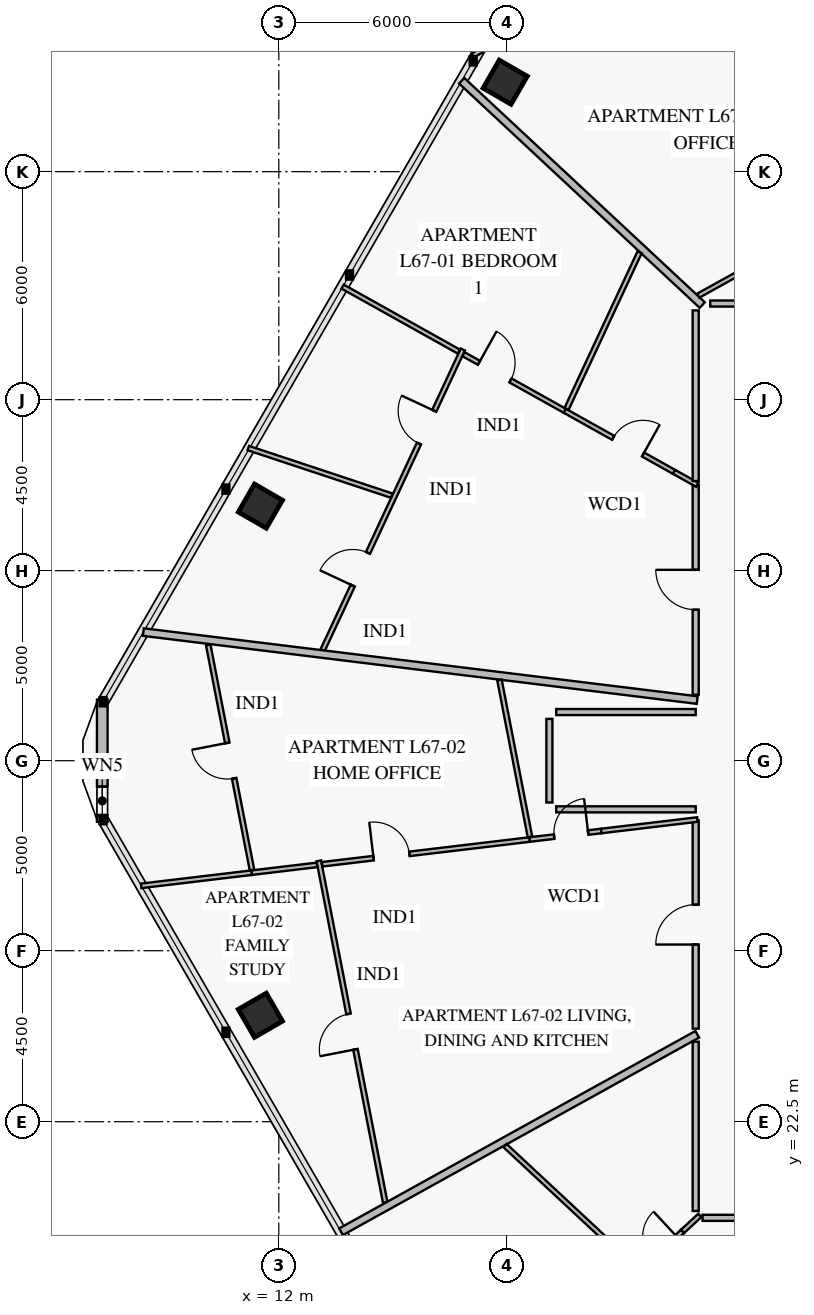
"""IFC4 building model, lengths in metres.
Left out: names, types, materials, properties, quantities, classifications, styles, units other than length and angle.
Written with IfcOpenShell. Run it as: python <this file> out.ifc"""

import sys

from ifc_helpers import new_model, si_unit, direction, frame, frame_2d, origin, origin_2d, place, context, subcontext, project, spatial, rectangle, extrude, element, fill, save


model = new_model("IFC4")
c1 = context("Model", 3, precision=1e-05, world=origin(), true_north=direction((0.0, 1.0)))
c2 = subcontext(c1, "Body", "Model", "MODEL_VIEW")
j1 = project(units=[si_unit("LENGTHUNIT", "METRE"), si_unit("PLANEANGLEUNIT", "RADIAN")], contexts=[c1])
p1 = place(None, origin())
s1 = spatial("IfcSite", under=j1, at=p1, CompositionType="ELEMENT")
p2 = place(p1, origin())
s2 = spatial("IfcBuilding", under=s1, at=p2, CompositionType="ELEMENT")
p3 = place(p2, frame((0.0, 0.0, 265.4)))
s3 = spatial("IfcBuildingStorey", under=s2, at=p3, CompositionType="ELEMENT", Elevation=265.4)
for number, where, z_axis, x_axis in (
    (1, (17.956, 49.855, 0.0), (0.0, 0.0, 1.0), (-0.5, -0.866, 0.0)),
    (2, (11.515, 38.699, 0.0), (0.0, 0.0, 1.0), (-0.5, -0.866, 0.0)),
    (3, (11.515, 25.301, 0.0), (0.0, 0.0, 1.0), (0.5, -0.866, 0.0)),
):
    element("IfcColumn", number, at=place(p3, frame(where, z_axis=z_axis, x_axis=x_axis)), inside=s3, PredefinedType="COLUMN", context=c2, shape_type="SweptSolid", body=[
        extrude(rectangle(XDim=0.85, YDim=0.85, at=origin_2d()), origin(), (0.0, 0.0, 1.0), 3.55),
    ])
p4 = place(p3, frame((7.355, 30.393, 0.0), z_axis=(0.0, 0.0, 1.0), x_axis=(0.0, 1.0, 0.0)))
e4 = element("IfcWall", 4, at=p4, inside=s3, PredefinedType="SOLIDWALL", context=c2, shape_type="SweptSolid", body=[
    extrude(rectangle(XDim=3.215, YDim=0.28, at=frame_2d((1.607, 0.0))), origin(), (0.0, 0.0, 1.0), 3.55),
])
p5 = place(p4, frame((0.176, 0.0, 0.85)))
e5 = element("IfcOpeningElement", 5, at=p5, cuts=e4, PredefinedType="OPENING", context=c2, shape_type="SweptSolid", body=[
    extrude(rectangle(XDim=0.75, YDim=1.5, at=frame_2d((0.375, 0.75))), frame((0.0, 0.152, 0.0), z_axis=(0.0, -1.0, 0.0), x_axis=(1.0, 0.0, 0.0)), (0.0, 0.0, 1.0), 0.304),
])
p6 = place(p3, frame((16.843, 42.821, 0.0), z_axis=(0.0, 0.0, 1.0), x_axis=(-0.422622187682, -0.90630595633, 0.0)))
e6 = element("IfcWall", 6, at=p6, inside=s3, PredefinedType="PARTITIONING", context=c2, shape_type="SweptSolid", body=[
    extrude(rectangle(XDim=8.732, YDim=0.12, at=frame_2d((4.366, 0.0))), origin(), (0.0, 0.0, 1.0), 2.95),
])
p7 = place(p6, frame((1.78, 0.0, 0.0)))
e7 = element("IfcOpeningElement", 7, at=p7, cuts=e6, PredefinedType="OPENING", context=c2, shape_type="SweptSolid", body=[
    extrude(rectangle(XDim=0.95, YDim=2.1, at=frame_2d((0.475, 1.05))), frame((0.0, 0.072, 0.0), z_axis=(0.0, -1.0, 0.0), x_axis=(1.0, 0.0, 0.0)), (0.0, 0.0, 1.0), 0.144),
])
p8 = place(p6, frame((5.906, 0.0, 0.0)))
e8 = element("IfcOpeningElement", 8, at=p8, cuts=e6, PredefinedType="OPENING", context=c2, shape_type="SweptSolid", body=[
    extrude(rectangle(XDim=0.95, YDim=2.1, at=frame_2d((0.475, 1.05))), frame((0.0, 0.072, 0.0), z_axis=(0.0, -1.0, 0.0), x_axis=(1.0, 0.0, 0.0)), (0.0, 0.0, 1.0), 0.144),
])
p9 = place(p3, frame((22.4, 39.601, 0.0), z_axis=(0.0, 0.0, 1.0), x_axis=(-0.8729286445, 0.487847908279, 0.0)))
e9 = element("IfcWall", 9, at=p9, inside=s3, PredefinedType="PARTITIONING", context=c2, shape_type="SweptSolid", body=[
    extrude(rectangle(XDim=3.297, YDim=0.12, at=frame_2d((1.649, 0.0))), origin(), (0.0, 0.0, 1.0), 3.15),
])
p10 = place(p9, frame((0.935, 0.0, 0.0)))
e10 = element("IfcOpeningElement", 10, at=p10, cuts=e9, PredefinedType="OPENING", context=c2, shape_type="SweptSolid", body=[
    extrude(rectangle(XDim=0.9, YDim=2.1, at=frame_2d((0.45, 1.05))), frame((0.0, 0.072, 0.0), z_axis=(0.0, -1.0, 0.0), x_axis=(1.0, 0.0, 0.0)), (0.0, 0.0, 1.0), 0.144),
])
p11 = place(p3, frame((19.521, 41.209, 0.0), z_axis=(0.0, 0.0, 1.0), x_axis=(-0.87290035316, 0.487898527824, 0.0)))
e11 = element("IfcWall", 11, at=p11, inside=s3, PredefinedType="PARTITIONING", context=c2, shape_type="SweptSolid", body=[
    extrude(rectangle(XDim=3.049, YDim=0.12, at=frame_2d((1.524, 0.0))), origin(), (0.0, 0.0, 1.0), 3.55),
])
p12 = place(p11, frame((1.633, 0.0, 0.0)))
e12 = element("IfcOpeningElement", 12, at=p12, cuts=e11, PredefinedType="OPENING", context=c2, shape_type="SweptSolid", body=[
    extrude(rectangle(XDim=0.95, YDim=2.1, at=frame_2d((0.475, 1.05))), frame((0.0, 0.072, 0.0), z_axis=(0.0, -1.0, 0.0), x_axis=(1.0, 0.0, 0.0)), (0.0, 0.0, 1.0), 0.144),
])
p13 = place(p3, frame((16.741, 42.763, 0.0), z_axis=(0.0, 0.0, 1.0), x_axis=(-0.872910360515, 0.487880623212, 0.0)))
e13 = element("IfcWall", 13, at=p13, inside=s3, PredefinedType="PARTITIONING", context=c2, shape_type="SweptSolid", body=[
    extrude(rectangle(XDim=3.508, YDim=0.12, at=frame_2d((1.754, 0.0))), origin(), (0.0, 0.0, 1.0), 2.93),
])
p14 = place(p3, frame((22.97, 39.259, 0.0), z_axis=(0.0, 0.0, 1.0), x_axis=(0.0, -1.0, 0.0)))
e14 = element("IfcWall", 14, at=p14, inside=s3, PredefinedType="PARTITIONING", context=c2, shape_type="SweptSolid", body=[
    extrude(rectangle(XDim=5.524, YDim=0.16, at=frame_2d((2.762, 0.0))), origin(), (0.0, 0.0, 1.0), 2.95),
])
p15 = place(p14, frame((2.237, 0.0, 0.0)))
e15 = element("IfcOpeningElement", 15, at=p15, cuts=e14, PredefinedType="OPENING", context=c2, shape_type="SweptSolid", body=[
    extrude(rectangle(XDim=1.05, YDim=2.15, at=frame_2d((0.525, 1.075))), frame((0.0, 0.092, 0.0), z_axis=(0.0, -1.0, 0.0), x_axis=(1.0, 0.0, 0.0)), (0.0, 0.0, 1.0), 0.184),
])
p16 = place(p3, frame((13.053, 29.365, 0.0), z_axis=(0.0, 0.0, 1.0), x_axis=(0.190811857209, -0.981626627159, 0.0)))
e16 = element("IfcWall", 16, at=p16, inside=s3, PredefinedType="PARTITIONING", context=c2, shape_type="SweptSolid", body=[
    extrude(rectangle(XDim=9.157, YDim=0.12, at=frame_2d((4.579, 0.0))), origin(), (0.0, 0.0, 1.0), 2.95),
])
p17 = place(p16, frame((4.104, 0.0, 0.0)))
e17 = element("IfcOpeningElement", 17, at=p17, cuts=e16, PredefinedType="OPENING", context=c2, shape_type="SweptSolid", body=[
    extrude(rectangle(XDim=0.95, YDim=2.1, at=frame_2d((0.475, 1.05))), frame((0.0, 0.072, 0.0), z_axis=(0.0, -1.0, 0.0), x_axis=(1.0, 0.0, 0.0)), (0.0, 0.0, 1.0), 0.144),
])
p18 = place(p3, frame((20.486, 30.15, 0.0), z_axis=(0.0, 0.0, 1.0), x_axis=(-0.992972480761, -0.118345479222, 0.0)))
e18 = element("IfcWall", 18, at=p18, inside=s3, PredefinedType="PARTITIONING", context=c2, shape_type="SweptSolid", body=[
    extrude(rectangle(XDim=1.902, YDim=0.12, at=frame_2d((0.951, 0.0))), origin(), (0.0, 0.0, 1.0), 3.55),
])
p19 = place(p18, frame((0.349, 0.0, 0.0)))
e19 = element("IfcOpeningElement", 19, at=p19, cuts=e18, PredefinedType="OPENING", context=c2, shape_type="SweptSolid", body=[
    extrude(rectangle(XDim=0.9, YDim=2.1, at=frame_2d((0.45, 1.05))), frame((0.0, 0.072, 0.0), z_axis=(0.0, -1.0, 0.0), x_axis=(1.0, 0.0, 0.0)), (0.0, 0.0, 1.0), 0.144),
])
p20 = place(p3, frame((18.597, 29.925, 0.0), z_axis=(0.0, 0.0, 1.0), x_axis=(-0.992967773956, -0.118384964774, 0.0)))
e20 = element("IfcWall", 20, at=p20, inside=s3, PredefinedType="PARTITIONING", context=c2, shape_type="SweptSolid", body=[
    extrude(rectangle(XDim=5.496, YDim=0.12, at=frame_2d((2.748, 0.0))), origin(), (0.0, 0.0, 1.0), 3.55),
])
p21 = place(p20, frame((3.183, 0.0, 0.0)))
e21 = element("IfcOpeningElement", 21, at=p21, cuts=e20, PredefinedType="OPENING", context=c2, shape_type="SweptSolid", body=[
    extrude(rectangle(XDim=0.95, YDim=2.1, at=frame_2d((0.475, 1.05))), frame((0.0, 0.072, 0.0), z_axis=(0.0, -1.0, 0.0), x_axis=(1.0, 0.0, 0.0)), (0.0, 0.0, 1.0), 0.144),
])
p22 = place(p3, frame((13.004, 29.258, 0.0), z_axis=(0.0, 0.0, 1.0), x_axis=(-0.992978430898, -0.118295544172, 0.0)))
e22 = element("IfcWall", 22, at=p22, inside=s3, PredefinedType="PARTITIONING", context=c2, shape_type="SweptSolid", body=[
    extrude(rectangle(XDim=1.734, YDim=0.12, at=frame_2d((0.867, 0.0))), origin(), (0.0, 0.0, 1.0), 2.93),
])
p23 = place(p3, frame((10.143, 35.047, 0.0), z_axis=(0.0, 0.0, 1.0), x_axis=(0.190784117101, -0.981632018967, 0.0)))
e23 = element("IfcWall", 23, at=p23, inside=s3, PredefinedType="PARTITIONING", context=c2, shape_type="SweptSolid", body=[
    extrude(rectangle(XDim=6.035, YDim=0.12, at=frame_2d((3.018, 0.0))), origin(), (0.0, 0.0, 1.0), 3.55),
])
p24 = place(p23, frame((2.627, 0.0, 0.0)))
e24 = element("IfcOpeningElement", 24, at=p24, cuts=e23, PredefinedType="OPENING", context=c2, shape_type="SweptSolid", body=[
    extrude(rectangle(XDim=0.95, YDim=2.1, at=frame_2d((0.475, 1.05))), frame((0.0, 0.072, 0.0), z_axis=(0.0, -1.0, 0.0), x_axis=(1.0, 0.0, 0.0)), (0.0, 0.0, 1.0), 0.144),
])
p25 = place(p3, frame((22.97, 30.426, 0.0), z_axis=(0.0, 0.0, 1.0), x_axis=(0.0, -1.0, 0.0)))
e25 = element("IfcWall", 25, at=p25, inside=s3, PredefinedType="PARTITIONING", context=c2, shape_type="SweptSolid", body=[
    extrude(rectangle(XDim=5.478, YDim=0.16, at=frame_2d((2.739, 0.0))), origin(), (0.0, 0.0, 1.0), 2.95),
])
p26 = place(p25, frame((2.214, 0.0, 0.0)))
e26 = element("IfcOpeningElement", 26, at=p26, cuts=e25, PredefinedType="OPENING", context=c2, shape_type="SweptSolid", body=[
    extrude(rectangle(XDim=1.05, YDim=2.15, at=frame_2d((0.525, 1.075))), frame((0.0, 0.092, 0.0), z_axis=(0.0, -1.0, 0.0), x_axis=(1.0, 0.0, 0.0)), (0.0, 0.0, 1.0), 0.184),
])
p27 = place(p3, frame((22.625, 19.615, 0.0), z_axis=(0.0, 0.0, 1.0), x_axis=(-0.733731867306, -0.679439141424, 0.0)))
e27 = element("IfcWall", 27, at=p27, inside=s3, PredefinedType="PARTITIONING", context=c2, shape_type="SweptSolid", body=[
    extrude(rectangle(XDim=1.565, YDim=0.12, at=frame_2d((0.782, 0.0))), origin(), (0.0, 0.0, 1.0), 3.55),
])
p28 = place(p27, frame((0.207, 0.0, 0.0)))
e28 = element("IfcOpeningElement", 28, at=p28, cuts=e27, PredefinedType="OPENING", context=c2, shape_type="SweptSolid", body=[
    extrude(rectangle(XDim=0.9, YDim=2.1, at=frame_2d((0.45, 1.05))), frame((0.0, 0.072, 0.0), z_axis=(0.0, -1.0, 0.0), x_axis=(1.0, 0.0, 0.0)), (0.0, 0.0, 1.0), 0.144),
])
p29 = place(p3, frame((23.15, 19.97, 0.0), z_axis=(0.0, 0.0, 1.0), x_axis=(1.0, 0.0, 0.0)))
e29 = element("IfcWall", 29, at=p29, inside=s3, PredefinedType="PARTITIONING", context=c2, shape_type="SweptSolid", body=[
    extrude(rectangle(XDim=7.09, YDim=0.16, at=frame_2d((3.545, 0.0))), origin(), (0.0, 0.0, 1.0), 2.95),
])
p30 = place(p29, frame((3.02, 0.0, 0.0)))
e30 = element("IfcOpeningElement", 30, at=p30, cuts=e29, PredefinedType="OPENING", context=c2, shape_type="SweptSolid", body=[
    extrude(rectangle(XDim=1.05, YDim=2.15, at=frame_2d((0.525, 1.075))), frame((0.0, 0.092, 0.0), z_axis=(0.0, -1.0, 0.0), x_axis=(1.0, 0.0, 0.0)), (0.0, 0.0, 1.0), 0.184),
])
p31 = place(p3, frame((25.26, 55.082, 0.0), z_axis=(0.0, 0.0, 1.0), x_axis=(-0.874617638419, -0.484813352298, 0.0)))
e31 = element("IfcWall", 31, at=p31, inside=s3, PredefinedType="PARTITIONING", context=c2, shape_type="SweptSolid", body=[
    extrude(rectangle(XDim=9.323, YDim=0.12, at=frame_2d((4.661, 0.0))), origin(), (0.0, 0.0, 1.0), 3.55),
])
p32 = place(p31, frame((3.882, 0.0, 0.0)))
e32 = element("IfcOpeningElement", 32, at=p32, cuts=e31, PredefinedType="OPENING", context=c2, shape_type="SweptSolid", body=[
    extrude(rectangle(XDim=0.95, YDim=2.1, at=frame_2d((0.475, 1.05))), frame((0.0, 0.072, 0.0), z_axis=(0.0, -1.0, 0.0), x_axis=(1.0, 0.0, 0.0)), (0.0, 0.0, 1.0), 0.144),
])
p33 = place(p3, frame((23.143, 43.99, 0.0), z_axis=(0.0, 0.0, 1.0), x_axis=(-0.731342217011, 0.682010675589, 0.0)))
e33 = element("IfcWall", 33, at=p33, inside=s3, PredefinedType="PARTITIONING", context=c2, shape_type="SweptSolid", body=[
    extrude(rectangle(XDim=8.656, YDim=0.2, at=frame_2d((4.328, 0.0))), origin(), (0.0, 0.0, 1.0), 2.93),
])
p34 = place(p3, frame((14.974, 38.974, 0.0), z_axis=(0.0, 0.0, 1.0), x_axis=(-0.949166828302, 0.31477346148, 0.0)))
e34 = element("IfcWall", 34, at=p34, inside=s3, PredefinedType="PARTITIONING", context=c2, shape_type="SweptSolid", body=[
    extrude(rectangle(XDim=3.98, YDim=0.12, at=frame_2d((1.99, 0.0))), origin(), (0.0, 0.0, 1.0), 2.93),
])
p35 = place(p3, frame((23.011, 39.259, 0.0), z_axis=(0.0, 0.0, 1.0), x_axis=(-0.872904168108, 0.48789170243, 0.0)))
e35 = element("IfcWall", 35, at=p35, inside=s3, PredefinedType="PARTITIONING", context=c2, shape_type="SweptSolid", body=[
    extrude(rectangle(XDim=0.7, YDim=0.12, at=frame_2d((0.35, 0.0))), origin(), (0.0, 0.0, 1.0), 3.55),
])
p36 = place(p3, frame((21.494, 45.38, 0.0), z_axis=(0.0, 0.0, 1.0), x_axis=(-0.422603236373, -0.906314793329, 0.0)))
e36 = element("IfcWall", 36, at=p36, inside=s3, PredefinedType="PARTITIONING", context=c2, shape_type="SweptSolid", body=[
    extrude(rectangle(XDim=4.547, YDim=0.12, at=frame_2d((2.273, 0.0))), origin(), (0.0, 0.0, 1.0), 3.15),
])
p37 = place(p3, frame((23.01, 33.595, 0.0), z_axis=(0.0, 0.0, 1.0), x_axis=(-0.992545643102, 0.121873485057, 0.0)))
e37 = element("IfcWall", 37, at=p37, inside=s3, PredefinedType="PARTITIONING", context=c2, shape_type="SweptSolid", body=[
    extrude(rectangle(XDim=14.684, YDim=0.2, at=frame_2d((7.342, 0.0))), origin(), (0.0, 0.0, 1.0), 2.93),
])
p38 = place(p3, frame((23.015, 30.452, 0.0), z_axis=(0.0, 0.0, 1.0), x_axis=(-0.992958240304, -0.118464902029, 0.0)))
e38 = element("IfcWall", 38, at=p38, inside=s3, PredefinedType="PARTITIONING", context=c2, shape_type="SweptSolid", body=[
    extrude(rectangle(XDim=2.547, YDim=0.12, at=frame_2d((1.273, 0.0))), origin(), (0.0, 0.0, 1.0), 3.55),
])
p39 = place(p3, frame((11.283, 29.053, 0.0), z_axis=(0.0, 0.0, 1.0), x_axis=(-0.992964231091, -0.118414677193, 0.0)))
e39 = element("IfcWall", 39, at=p39, inside=s3, PredefinedType="PARTITIONING", context=c2, shape_type="SweptSolid", body=[
    extrude(rectangle(XDim=2.926, YDim=0.12, at=frame_2d((1.463, 0.0))), origin(), (0.0, 0.0, 1.0), 3.55),
])
p40 = place(p3, frame((17.806, 34.125, 0.0), z_axis=(0.0, 0.0, 1.0), x_axis=(0.190824624048, -0.981624145413, 0.0)))
e40 = element("IfcWall", 40, at=p40, inside=s3, PredefinedType="PARTITIONING", context=c2, shape_type="SweptSolid", body=[
    extrude(rectangle(XDim=4.208, YDim=0.12, at=frame_2d((2.104, 0.0))), origin(), (0.0, 0.0, 1.0), 3.55),
])
p41 = place(p3, frame((23.01, 24.8, 0.0), z_axis=(0.0, 0.0, 1.0), x_axis=(-0.874612572959, -0.484822490426, 0.0)))
e41 = element("IfcWall", 41, at=p41, inside=s3, PredefinedType="PARTITIONING", context=c2, shape_type="SweptSolid", body=[
    extrude(rectangle(XDim=10.715, YDim=0.2, at=frame_2d((5.358, 0.0))), origin(), (0.0, 0.0, 1.0), 2.93),
])
p42 = place(p3, frame((23.079, 20.035, 0.0), z_axis=(0.0, 0.0, 1.0), x_axis=(-0.733833594252, -0.679329269167, 0.0)))
e42 = element("IfcWall", 42, at=p42, inside=s3, PredefinedType="PARTITIONING", context=c2, shape_type="SweptSolid", body=[
    extrude(rectangle(XDim=0.618, YDim=0.12, at=frame_2d((0.309, 0.0))), origin(), (0.0, 0.0, 1.0), 3.55),
])
p43 = place(p3, frame((17.952, 21.872, 0.0), z_axis=(0.0, 0.0, 1.0), x_axis=(0.731364558904, -0.681986716864, 0.0)))
e43 = element("IfcWall", 43, at=p43, inside=s3, PredefinedType="PARTITIONING", context=c2, shape_type="SweptSolid", body=[
    extrude(rectangle(XDim=4.776, YDim=0.12, at=frame_2d((2.388, 0.0))), origin(), (0.0, 0.0, 1.0), 3.15),
])
p44 = place(p3, frame((28.796, 47.429, 0.0), z_axis=(0.0, 0.0, 1.0), x_axis=(-0.874623780767, -0.484802271155, 0.0)))
e44 = element("IfcWall", 44, at=p44, inside=s3, PredefinedType="PARTITIONING", context=c2, shape_type="SweptSolid", body=[
    extrude(rectangle(XDim=6.585, YDim=0.12, at=frame_2d((3.293, 0.0))), origin(), (0.0, 0.0, 1.0), 2.95),
])
p45 = place(p3, frame((22.97, 43.85, 0.0), z_axis=(0.0, 0.0, 1.0), x_axis=(0.0, -1.0, 0.0)))
e45 = element("IfcWall", 45, at=p45, inside=s3, PredefinedType="PARTITIONING", context=c2, shape_type="SweptSolid", body=[
    extrude(rectangle(XDim=4.49, YDim=0.16, at=frame_2d((2.245, 0.0))), origin(), (0.0, 0.0, 1.0), 3.55),
])
for number, where, z_axis, x_axis in (
    (46, (22.97, 33.28, 0.0), (0.0, 0.0, 1.0), (-1.0, 0.0, 0.0)),
    (47, (19.3, 30.72, 0.0), (0.0, 0.0, 1.0), (1.0, 0.0, 0.0)),
):
    element("IfcWall", number, at=place(p3, frame(where, z_axis=z_axis, x_axis=x_axis)), inside=s3, PredefinedType="PARTITIONING", context=c2, shape_type="SweptSolid", body=[
        extrude(rectangle(XDim=3.67, YDim=0.16, at=frame_2d((1.835, 0.0))), origin(), (0.0, 0.0, 1.0), 3.55),
    ])
p46 = place(p3, frame((19.12, 33.1, 0.0), z_axis=(0.0, 0.0, 1.0), x_axis=(0.0, -1.0, 0.0)))
e48 = element("IfcWall", 48, at=p46, inside=s3, PredefinedType="PARTITIONING", context=c2, shape_type="SweptSolid", body=[
    extrude(rectangle(XDim=2.2, YDim=0.16, at=frame_2d((1.1, 0.0))), origin(), (0.0, 0.0, 1.0), 3.55),
])
p47 = place(p3, frame((22.97, 24.605, 0.0), z_axis=(0.0, 0.0, 1.0), x_axis=(0.0, -1.0, 0.0)))
e49 = element("IfcWall", 49, at=p47, inside=s3, PredefinedType="PARTITIONING", context=c2, shape_type="SweptSolid", body=[
    extrude(rectangle(XDim=4.455, YDim=0.16, at=frame_2d((2.228, 0.0))), origin(), (0.0, 0.0, 1.0), 3.55),
])
p48 = place(p3, frame((30.366, 44.03, 0.0), z_axis=(0.0, 0.0, 1.0), x_axis=(-1.0, 0.0, 0.0)))
e50 = element("IfcWall", 50, at=p48, inside=s3, PredefinedType="PARTITIONING", context=c2, shape_type="SweptSolid", body=[
    extrude(rectangle(XDim=7.014, YDim=0.16, at=frame_2d((3.507, 0.0))), origin(), (0.0, 0.0, 1.0), 2.95),
])
p49 = place(p5, origin())
e51 = element("IfcWindow", 51, at=p49, inside=s3, PartitioningType="SINGLE_PANEL", PredefinedType="WINDOW", context=c2, shape_type="SweptSolid", body=[
    extrude(rectangle(XDim=0.75, YDim=1.5, at=frame_2d((0.375, 0.75))), frame((0.0, 0.03, 0.0), z_axis=(0.0, -1.0, 0.0), x_axis=(1.0, 0.0, 0.0)), (0.0, 0.0, 1.0), 0.06),
])
fill(e5, e51)
p50 = place(p7, frame((0.95, 0.0, 0.0), z_axis=(0.0, 0.0, 1.0), x_axis=(-1.0, 0.0, 0.0)))
e52 = element("IfcDoor", 52, at=p50, inside=s3, OperationType="SINGLE_SWING_RIGHT", PredefinedType="DOOR", context=c2, shape_type="SweptSolid", body=[
    extrude(rectangle(XDim=0.95, YDim=2.1, at=frame_2d((0.475, 1.05))), frame((0.0, 0.025, 0.0), z_axis=(0.0, -1.0, 0.0), x_axis=(1.0, 0.0, 0.0)), (0.0, 0.0, 1.0), 0.05),
])
fill(e7, e52)
p51 = place(p8, frame((0.95, 0.0, 0.0), z_axis=(0.0, 0.0, 1.0), x_axis=(-1.0, 0.0, 0.0)))
e53 = element("IfcDoor", 53, at=p51, inside=s3, OperationType="SINGLE_SWING_LEFT", PredefinedType="DOOR", context=c2, shape_type="SweptSolid", body=[
    extrude(rectangle(XDim=0.95, YDim=2.1, at=frame_2d((0.475, 1.05))), frame((0.0, 0.025, 0.0), z_axis=(0.0, -1.0, 0.0), x_axis=(1.0, 0.0, 0.0)), (0.0, 0.0, 1.0), 0.05),
])
fill(e8, e53)
p52 = place(p10, frame((0.9, 0.0, 0.0), z_axis=(0.0, 0.0, 1.0), x_axis=(-1.0, 0.0, 0.0)))
e54 = element("IfcDoor", 54, at=p52, inside=s3, OperationType="SINGLE_SWING_RIGHT", PredefinedType="DOOR", context=c2, shape_type="SweptSolid", body=[
    extrude(rectangle(XDim=0.9, YDim=2.1, at=frame_2d((0.45, 1.05))), frame((0.0, 0.025, 0.0), z_axis=(0.0, -1.0, 0.0), x_axis=(1.0, 0.0, 0.0)), (0.0, 0.0, 1.0), 0.05),
])
fill(e10, e54)
p53 = place(p12, frame((0.95, 0.0, 0.0), z_axis=(0.0, 0.0, 1.0), x_axis=(-1.0, 0.0, 0.0)))
e55 = element("IfcDoor", 55, at=p53, inside=s3, OperationType="SINGLE_SWING_LEFT", PredefinedType="DOOR", context=c2, shape_type="SweptSolid", body=[
    extrude(rectangle(XDim=0.95, YDim=2.1, at=frame_2d((0.475, 1.05))), frame((0.0, 0.025, 0.0), z_axis=(0.0, -1.0, 0.0), x_axis=(1.0, 0.0, 0.0)), (0.0, 0.0, 1.0), 0.05),
])
fill(e12, e55)
p54 = place(p15, frame((1.05, 0.0, 0.0), z_axis=(0.0, 0.0, 1.0), x_axis=(-1.0, 0.0, 0.0)))
e56 = element("IfcDoor", 56, at=p54, inside=s3, OperationType="SINGLE_SWING_RIGHT", PredefinedType="DOOR", context=c2, shape_type="SweptSolid", body=[
    extrude(rectangle(XDim=1.05, YDim=2.15, at=frame_2d((0.525, 1.075))), frame((0.0, 0.025, 0.0), z_axis=(0.0, -1.0, 0.0), x_axis=(1.0, 0.0, 0.0)), (0.0, 0.0, 1.0), 0.05),
])
fill(e15, e56)
p55 = place(p17, frame((0.95, 0.0, 0.0), z_axis=(0.0, 0.0, 1.0), x_axis=(-1.0, 0.0, 0.0)))
e57 = element("IfcDoor", 57, at=p55, inside=s3, OperationType="SINGLE_SWING_LEFT", PredefinedType="DOOR", context=c2, shape_type="SweptSolid", body=[
    extrude(rectangle(XDim=0.95, YDim=2.1, at=frame_2d((0.475, 1.05))), frame((0.0, 0.025, 0.0), z_axis=(0.0, -1.0, 0.0), x_axis=(1.0, 0.0, 0.0)), (0.0, 0.0, 1.0), 0.05),
])
fill(e17, e57)
p56 = place(p19, frame((0.9, 0.0, 0.0), z_axis=(0.0, 0.0, 1.0), x_axis=(-1.0, 0.0, 0.0)))
e58 = element("IfcDoor", 58, at=p56, inside=s3, OperationType="SINGLE_SWING_RIGHT", PredefinedType="DOOR", context=c2, shape_type="SweptSolid", body=[
    extrude(rectangle(XDim=0.9, YDim=2.1, at=frame_2d((0.45, 1.05))), frame((0.0, 0.025, 0.0), z_axis=(0.0, -1.0, 0.0), x_axis=(1.0, 0.0, 0.0)), (0.0, 0.0, 1.0), 0.05),
])
fill(e19, e58)
p57 = place(p21, frame((0.95, 0.0, 0.0), z_axis=(0.0, 0.0, 1.0), x_axis=(-1.0, 0.0, 0.0)))
e59 = element("IfcDoor", 59, at=p57, inside=s3, OperationType="SINGLE_SWING_LEFT", PredefinedType="DOOR", context=c2, shape_type="SweptSolid", body=[
    extrude(rectangle(XDim=0.95, YDim=2.1, at=frame_2d((0.475, 1.05))), frame((0.0, 0.025, 0.0), z_axis=(0.0, -1.0, 0.0), x_axis=(1.0, 0.0, 0.0)), (0.0, 0.0, 1.0), 0.05),
])
fill(e21, e59)
p58 = place(p24, frame((0.95, 0.0, 0.0), z_axis=(0.0, 0.0, 1.0), x_axis=(-1.0, 0.0, 0.0)))
e60 = element("IfcDoor", 60, at=p58, inside=s3, OperationType="SINGLE_SWING_RIGHT", PredefinedType="DOOR", context=c2, shape_type="SweptSolid", body=[
    extrude(rectangle(XDim=0.95, YDim=2.1, at=frame_2d((0.475, 1.05))), frame((0.0, 0.025, 0.0), z_axis=(0.0, -1.0, 0.0), x_axis=(1.0, 0.0, 0.0)), (0.0, 0.0, 1.0), 0.05),
])
fill(e24, e60)
p59 = place(p26, frame((1.05, 0.0, 0.0), z_axis=(0.0, 0.0, 1.0), x_axis=(-1.0, 0.0, 0.0)))
e61 = element("IfcDoor", 61, at=p59, inside=s3, OperationType="SINGLE_SWING_LEFT", PredefinedType="DOOR", context=c2, shape_type="SweptSolid", body=[
    extrude(rectangle(XDim=1.05, YDim=2.15, at=frame_2d((0.525, 1.075))), frame((0.0, 0.025, 0.0), z_axis=(0.0, -1.0, 0.0), x_axis=(1.0, 0.0, 0.0)), (0.0, 0.0, 1.0), 0.05),
])
fill(e26, e61)
save(model, sys.argv[1])
